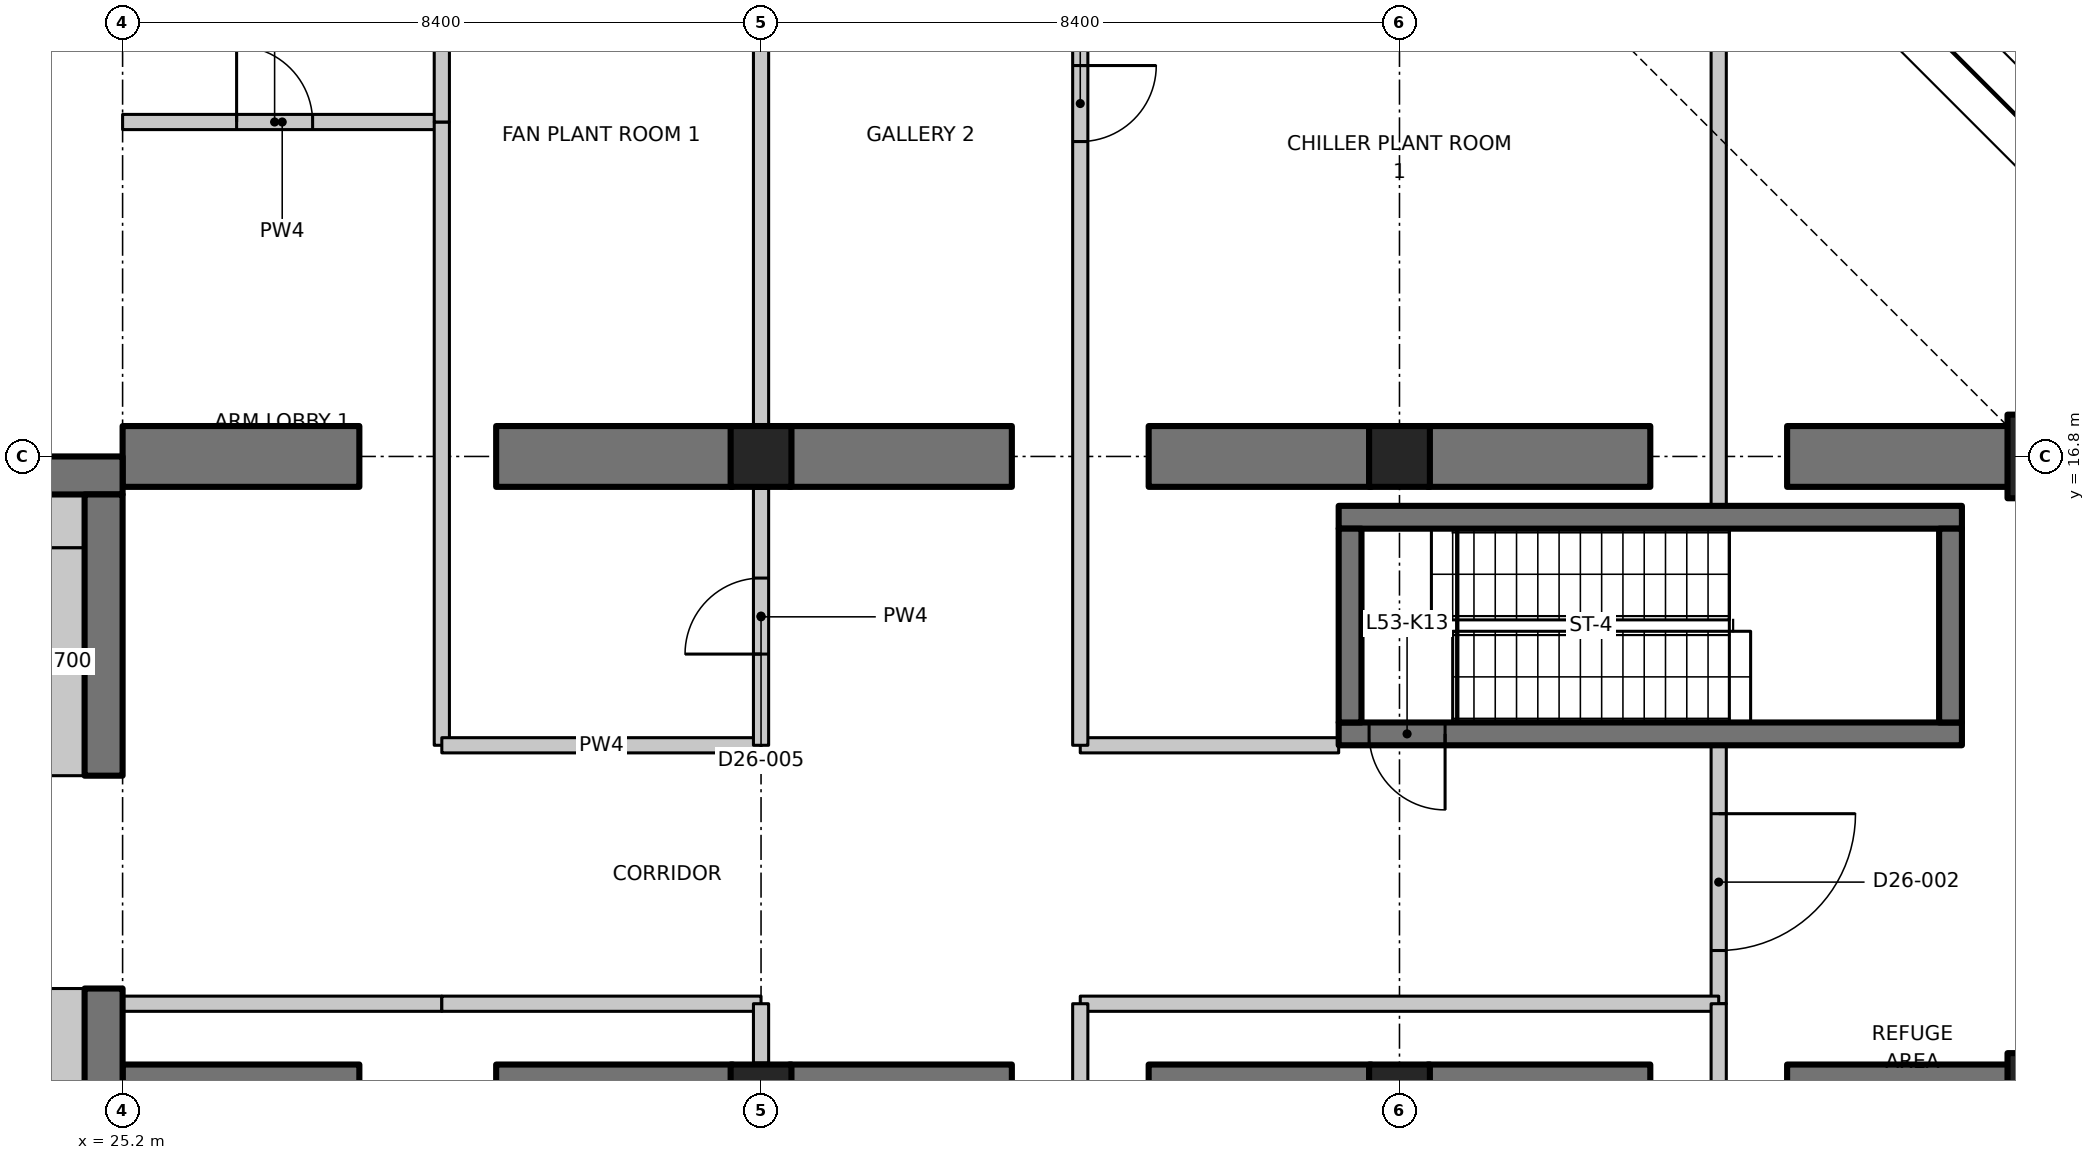
"""IFC4 building model, lengths in metres.
Left out: names, types, materials, properties, quantities, classifications, styles, units other than length and angle.
Written with IfcOpenShell. Run it as: python <this file> out.ifc"""

import sys

from ifc_helpers import new_model, si_unit, direction, frame, frame_2d, origin, origin_2d, place, context, subcontext, project, spatial, polyline, rectangle, outline, extrude, element, fill, save


model = new_model("IFC4")
c1 = context("Model", 3, precision=1e-05, world=origin(), true_north=direction((0.0, 1.0)))
c2 = subcontext(c1, "Body", "Model", "MODEL_VIEW")
j1 = project(units=[si_unit("LENGTHUNIT", "METRE"), si_unit("PLANEANGLEUNIT", "RADIAN")], contexts=[c1])
p1 = place(None, origin())
s1 = spatial("IfcSite", under=j1, at=p1, CompositionType="ELEMENT")
p2 = place(p1, origin())
s2 = spatial("IfcBuilding", under=s1, at=p2, CompositionType="ELEMENT")
p3 = place(p2, frame((0.0, 0.0, 210.9)))
s3 = spatial("IfcBuildingStorey", under=s2, at=p3, CompositionType="ELEMENT", Elevation=210.9)
for number, where, z_axis, x_axis in (
    (1, (33.6, 8.4, 0.0), (0.0, 0.0, 1.0), (1.0, 0.0, 0.0)),
    (2, (33.6, 16.8, 0.0), (0.0, 0.0, 1.0), (1.0, 0.0, 0.0)),
    (3, (42.0, 8.4, 0.0), (0.0, 0.0, 1.0), (1.0, 0.0, 0.0)),
    (4, (42.0, 16.8, 0.0), (0.0, 0.0, 1.0), (1.0, 0.0, 0.0)),
):
    element("IfcColumn", number, at=place(p3, frame(where, z_axis=z_axis, x_axis=x_axis)), inside=s3, PredefinedType="COLUMN", context=c2, shape_type="SweptSolid", body=[
        extrude(rectangle(XDim=0.8, YDim=0.8, at=origin_2d()), origin(), (0.0, 0.0, 1.0), 4.55),
    ])
for number, where, z_axis, x_axis in (
    (5, (50.4, 8.4, 0.0), (0.0, 0.0, 1.0), (1.0, 0.0, 0.0)),
    (6, (50.4, 16.8, 0.0), (0.0, 0.0, 1.0), (1.0, 0.0, 0.0)),
):
    element("IfcColumn", number, at=place(p3, frame(where, z_axis=z_axis, x_axis=x_axis)), inside=s3, PredefinedType="COLUMN", context=c2, shape_type="SweptSolid", body=[
        extrude(rectangle(XDim=0.8, YDim=1.1, at=origin_2d()), origin(), (0.0, 0.0, 1.0), 4.55),
    ])
for number, where, z_axis, x_axis in (
    (7, (25.2, 8.4, 0.0), (0.0, 0.0, 1.0), (1.0, 0.0, 0.0)),
    (8, (30.115, 8.4, 0.0), (0.0, 0.0, 1.0), (1.0, 0.0, 0.0)),
):
    element("IfcWall", number, at=place(p3, frame(where, z_axis=z_axis, x_axis=x_axis)), inside=s3, PredefinedType="SHEAR", context=c2, shape_type="SweptSolid", body=[
        extrude(rectangle(XDim=3.115, YDim=0.8, at=frame_2d((1.558, 0.0))), origin(), (0.0, 0.0, 1.0), 4.55),
    ])
for number, where, z_axis, x_axis in (
    (9, (33.97, 8.4, 0.0), (0.0, 0.0, 1.0), (1.0, 0.0, 0.0)),
    (10, (38.7, 8.4, 0.0), (0.0, 0.0, 1.0), (1.0, 0.0, 0.0)),
    (11, (42.37, 8.4, 0.0), (0.0, 0.0, 1.0), (1.0, 0.0, 0.0)),
    (12, (47.1, 8.4, 0.0), (0.0, 0.0, 1.0), (1.0, 0.0, 0.0)),
):
    element("IfcWall", number, at=place(p3, frame(where, z_axis=z_axis, x_axis=x_axis)), inside=s3, PredefinedType="SHEAR", context=c2, shape_type="SweptSolid", body=[
        extrude(rectangle(XDim=2.93, YDim=0.8, at=frame_2d((1.465, 0.0))), origin(), (0.0, 0.0, 1.0), 4.55),
    ])
for number, where, z_axis, x_axis in (
    (13, (25.2, 16.8, 0.0), (0.0, 0.0, 1.0), (1.0, 0.0, 0.0)),
    (14, (30.115, 16.8, 0.0), (0.0, 0.0, 1.0), (1.0, 0.0, 0.0)),
):
    element("IfcWall", number, at=place(p3, frame(where, z_axis=z_axis, x_axis=x_axis)), inside=s3, PredefinedType="SHEAR", context=c2, shape_type="SweptSolid", body=[
        extrude(rectangle(XDim=3.115, YDim=0.8, at=frame_2d((1.558, 0.0))), origin(), (0.0, 0.0, 1.0), 4.55),
    ])
for number, where, z_axis, x_axis in (
    (15, (33.97, 16.8, 0.0), (0.0, 0.0, 1.0), (1.0, 0.0, 0.0)),
    (16, (38.7, 16.8, 0.0), (0.0, 0.0, 1.0), (1.0, 0.0, 0.0)),
    (17, (42.37, 16.8, 0.0), (0.0, 0.0, 1.0), (1.0, 0.0, 0.0)),
    (18, (47.1, 16.8, 0.0), (0.0, 0.0, 1.0), (1.0, 0.0, 0.0)),
):
    element("IfcWall", number, at=place(p3, frame(where, z_axis=z_axis, x_axis=x_axis)), inside=s3, PredefinedType="SHEAR", context=c2, shape_type="SweptSolid", body=[
        extrude(rectangle(XDim=2.93, YDim=0.8, at=frame_2d((1.465, 0.0))), origin(), (0.0, 0.0, 1.0), 4.55),
    ])
p4 = place(p3, frame((23.8, 16.55, 0.0), z_axis=(0.0, 0.0, 1.0), x_axis=(1.0, 0.0, 0.0)))
e19 = element("IfcWall", 19, at=p4, inside=s3, PredefinedType="SHEAR", context=c2, shape_type="SweptSolid", body=[
    extrude(rectangle(XDim=1.4, YDim=0.5, at=frame_2d((0.7, 0.0))), origin(), (0.0, 0.0, 1.0), 4.55),
])
p5 = place(p3, frame((24.95, 0.5, 0.0), z_axis=(0.0, 0.0, 1.0), x_axis=(0.0, 1.0, 0.0)))
e20 = element("IfcWall", 20, at=p5, inside=s3, PredefinedType="SHEAR", context=c2, shape_type="SweptSolid", body=[
    extrude(rectangle(XDim=9.3, YDim=0.5, at=frame_2d((4.65, 0.0))), origin(), (0.0, 0.0, 1.0), 4.55),
])
p6 = place(p3, frame((24.95, 12.6, 0.0), z_axis=(0.0, 0.0, 1.0), x_axis=(0.0, 1.0, 0.0)))
e21 = element("IfcWall", 21, at=p6, inside=s3, PredefinedType="SHEAR", context=c2, shape_type="SweptSolid", body=[
    extrude(rectangle(XDim=3.7, YDim=0.5, at=frame_2d((1.85, 0.0))), origin(), (0.0, 0.0, 1.0), 4.55),
])
p7 = place(p3, frame((24.35, 12.6, 0.0), z_axis=(0.0, 0.0, 1.0), x_axis=(0.0, 1.0, 0.0)))
e22 = element("IfcWall", 22, at=p7, inside=s3, PredefinedType="PARTITIONING", context=c2, shape_type="SweptSolid", body=[
    extrude(rectangle(XDim=3.0, YDim=0.7, at=frame_2d((1.5, 0.0))), origin(), (0.0, 0.0, 1.0), 4.55),
])
p8 = place(p3, frame((23.8, 15.95, 0.0), z_axis=(0.0, 0.0, 1.0), x_axis=(1.0, 0.0, 0.0)))
e23 = element("IfcWall", 23, at=p8, inside=s3, PredefinedType="PARTITIONING", context=c2, shape_type="SweptSolid", body=[
    extrude(rectangle(XDim=0.9, YDim=0.7, at=frame_2d((0.45, 0.0))), origin(), (0.0, 0.0, 1.0), 4.55),
])
p9 = place(p3, frame((49.4, 13.15, 0.0), z_axis=(0.0, 0.0, 1.0), x_axis=(-1.0, 0.0, 0.0)))
e24 = element("IfcWall", 24, at=p9, inside=s3, PredefinedType="SHEAR", context=c2, shape_type="SweptSolid", body=[
    extrude(rectangle(XDim=8.2, YDim=0.3, at=frame_2d((4.1, 0.0))), origin(), (0.0, 0.0, 1.0), 4.55),
])
p10 = place(p9, frame((6.8, 0.0, 0.0)))
e25 = element("IfcOpeningElement", 25, at=p10, cuts=e24, PredefinedType="OPENING", context=c2, shape_type="SweptSolid", body=[
    extrude(rectangle(XDim=1.0, YDim=2.1, at=frame_2d((0.5, 1.05))), frame((0.0, 0.16, 0.0), z_axis=(0.0, -1.0, 0.0), x_axis=(1.0, 0.0, 0.0)), (0.0, 0.0, 1.0), 0.32),
])
p11 = place(p3, frame((41.2, 16.0, 0.0), z_axis=(0.0, 0.0, 1.0), x_axis=(1.0, 0.0, 0.0)))
e26 = element("IfcWall", 26, at=p11, inside=s3, PredefinedType="SHEAR", context=c2, shape_type="SweptSolid", body=[
    extrude(rectangle(XDim=8.2, YDim=0.3, at=frame_2d((4.1, 0.0))), origin(), (0.0, 0.0, 1.0), 4.55),
])
for number, where, z_axis, x_axis in (
    (27, (41.35, 13.3, 0.0), (0.0, 0.0, 1.0), (0.0, 1.0, 0.0)),
    (28, (49.25, 13.3, 0.0), (0.0, 0.0, 1.0), (0.0, 1.0, 0.0)),
):
    element("IfcWall", number, at=place(p3, frame(where, z_axis=z_axis, x_axis=x_axis)), inside=s3, PredefinedType="SHEAR", context=c2, shape_type="SweptSolid", body=[
        extrude(rectangle(XDim=2.55, YDim=0.3, at=frame_2d((1.275, 0.0))), origin(), (0.0, 0.0, 1.0), 4.55),
    ])
p12 = place(p3, frame((24.35, 4.35, 0.0), z_axis=(0.0, 0.0, 1.0), x_axis=(0.0, 1.0, 0.0)))
e29 = element("IfcWall", 29, at=p12, inside=s3, PredefinedType="PARTITIONING", context=c2, shape_type="SweptSolid", body=[
    extrude(rectangle(XDim=5.45, YDim=0.7, at=frame_2d((2.725, 0.0))), origin(), (0.0, 0.0, 1.0), 4.55),
])
p13 = place(p3, frame((25.2, 21.2, 0.0), z_axis=(0.0, 0.0, 1.0), x_axis=(1.0, 0.0, 0.0)))
e30 = element("IfcWall", 30, at=p13, inside=s3, PredefinedType="PARTITIONING", context=c2, shape_type="SweptSolid", body=[
    extrude(rectangle(XDim=4.2, YDim=0.2, at=frame_2d((2.1, 0.0))), origin(), (0.0, 0.0, 1.0), 4.53),
])
p14 = place(p13, frame((1.5, 0.0, 0.0)))
e31 = element("IfcOpeningElement", 31, at=p14, cuts=e30, PredefinedType="OPENING", context=c2, shape_type="SweptSolid", body=[
    extrude(rectangle(XDim=1.0, YDim=2.1, at=frame_2d((0.5, 1.05))), frame((0.0, 0.11, 0.0), z_axis=(0.0, -1.0, 0.0), x_axis=(1.0, 0.0, 0.0)), (0.0, 0.0, 1.0), 0.22),
])
p15 = place(p3, frame((29.4, 9.6, 0.0), z_axis=(0.0, 0.0, 1.0), x_axis=(-1.0, 0.0, 0.0)))
e32 = element("IfcWall", 32, at=p15, inside=s3, PredefinedType="PARTITIONING", context=c2, shape_type="SweptSolid", body=[
    extrude(rectangle(XDim=4.2, YDim=0.2, at=frame_2d((2.1, 0.0))), origin(), (0.0, 0.0, 1.0), 4.53),
])
p16 = place(p3, frame((29.4, 21.2, 0.0), z_axis=(0.0, 0.0, 1.0), x_axis=(0.0, -1.0, 0.0)))
e33 = element("IfcWall", 33, at=p16, inside=s3, PredefinedType="PARTITIONING", context=c2, shape_type="SweptSolid", body=[
    extrude(rectangle(XDim=8.2, YDim=0.2, at=frame_2d((4.1, 0.0))), origin(), (0.0, 0.0, 1.0), 4.53),
])
p17 = place(p3, frame((29.4, 27.51, 0.0), z_axis=(0.0, 0.0, 1.0), x_axis=(0.0, -1.0, 0.0)))
e34 = element("IfcWall", 34, at=p17, inside=s3, PredefinedType="PARTITIONING", context=c2, shape_type="SweptSolid", body=[
    extrude(outline(polyline([(0.0, 0.0), (6.31, 0.0), (6.31, 4.53), (2.76, 4.53), (2.758, 4.18), (1.862, 4.18), (1.86, 4.53), (0.235, 4.53), (0.0, 4.53), (0.0, 0.0)])), frame((0.0, 0.1, 0.0), z_axis=(0.0, -1.0, 0.0), x_axis=(1.0, 0.0, 0.0)), (0.0, 0.0, 1.0), 0.2),
])
p18 = place(p3, frame((46.2, 13.0, 0.0), z_axis=(0.0, 0.0, 1.0), x_axis=(0.0, -1.0, 0.0)))
e35 = element("IfcWall", 35, at=p18, inside=s3, PredefinedType="PARTITIONING", context=c2, shape_type="SweptSolid", body=[
    extrude(rectangle(XDim=3.4, YDim=0.2, at=frame_2d((1.7, 0.0))), origin(), (0.0, 0.0, 1.0), 4.53),
])
p19 = place(p18, frame((0.9, 0.0, 0.0)))
e36 = element("IfcOpeningElement", 36, at=p19, cuts=e35, PredefinedType="OPENING", context=c2, shape_type="SweptSolid", body=[
    extrude(rectangle(XDim=1.8, YDim=2.1, at=frame_2d((0.9, 1.05))), frame((0.0, 0.11, 0.0), z_axis=(0.0, -1.0, 0.0), x_axis=(1.0, 0.0, 0.0)), (0.0, 0.0, 1.0), 0.22),
])
p20 = place(p3, frame((33.6, 9.6, 0.0), z_axis=(0.0, 0.0, 1.0), x_axis=(-1.0, 0.0, 0.0)))
e37 = element("IfcWall", 37, at=p20, inside=s3, PredefinedType="PARTITIONING", context=c2, shape_type="SweptSolid", body=[
    extrude(rectangle(XDim=4.2, YDim=0.2, at=frame_2d((2.1, 0.0))), origin(), (0.0, 0.0, 1.0), 4.53),
])
p21 = place(p3, frame((46.2, 9.6, 0.0), z_axis=(0.0, 0.0, 1.0), x_axis=(-1.0, 0.0, 0.0)))
e38 = element("IfcWall", 38, at=p21, inside=s3, PredefinedType="PARTITIONING", context=c2, shape_type="SweptSolid", body=[
    extrude(rectangle(XDim=8.4, YDim=0.2, at=frame_2d((4.2, 0.0))), origin(), (0.0, 0.0, 1.0), 4.53),
])
p22 = place(p3, frame((29.4, 13.0, 0.0), z_axis=(0.0, 0.0, 1.0), x_axis=(1.0, 0.0, 0.0)))
e39 = element("IfcWall", 39, at=p22, inside=s3, PredefinedType="PARTITIONING", context=c2, shape_type="SweptSolid", body=[
    extrude(rectangle(XDim=4.2, YDim=0.2, at=frame_2d((2.1, 0.0))), origin(), (0.0, 0.0, 1.0), 4.53),
])
p23 = place(p3, frame((37.8, 13.0, 0.0), z_axis=(0.0, 0.0, 1.0), x_axis=(1.0, 0.0, 0.0)))
e40 = element("IfcWall", 40, at=p23, inside=s3, PredefinedType="PARTITIONING", context=c2, shape_type="SweptSolid", body=[
    extrude(rectangle(XDim=3.4, YDim=0.2, at=frame_2d((1.7, 0.0))), origin(), (0.0, 0.0, 1.0), 4.53),
])
p24 = place(p3, frame((46.2, -0.2, 0.0), z_axis=(0.0, 0.0, 1.0), x_axis=(0.0, 1.0, 0.0)))
e41 = element("IfcWall", 41, at=p24, inside=s3, PredefinedType="PARTITIONING", context=c2, shape_type="SweptSolid", body=[
    extrude(outline(polyline([(0.0, 0.0), (9.8, 0.0), (9.8, 4.53), (5.116, 4.53), (5.114, 4.18), (3.686, 4.18), (3.684, 4.53), (0.0, 4.53), (0.0, 0.0)])), frame((0.0, 0.1, 0.0), z_axis=(0.0, -1.0, 0.0), x_axis=(1.0, 0.0, 0.0)), (0.0, 0.0, 1.0), 0.2),
])
p25 = place(p3, frame((46.2, 16.15, 0.0), z_axis=(0.0, 0.0, 1.0), x_axis=(0.0, 1.0, 0.0)))
e42 = element("IfcWall", 42, at=p25, inside=s3, PredefinedType="PARTITIONING", context=c2, shape_type="SweptSolid", body=[
    extrude(outline(polyline([(0.0, 0.0), (9.654, 0.0), (9.654, 4.53), (9.25, 4.53), (5.566, 4.53), (5.564, 4.18), (4.136, 4.18), (4.134, 4.53), (0.0, 4.53), (0.0, 0.0)])), frame((0.0, 0.1, 0.0), z_axis=(0.0, -1.0, 0.0), x_axis=(1.0, 0.0, 0.0)), (0.0, 0.0, 1.0), 0.2),
])
p26 = place(p3, frame((33.6, 8.82, 0.0), z_axis=(0.0, 0.0, 1.0), x_axis=(0.0, 1.0, 0.0)))
e43 = element("IfcWall", 43, at=p26, inside=s3, PredefinedType="PARTITIONING", context=c2, shape_type="SweptSolid", body=[
    extrude(rectangle(XDim=0.78, YDim=0.2, at=frame_2d((0.39, 0.0))), origin(), (0.0, 0.0, 1.0), 4.53),
])
p27 = place(p3, frame((37.8, 9.6, 0.0), z_axis=(0.0, 0.0, 1.0), x_axis=(0.0, -1.0, 0.0)))
e44 = element("IfcWall", 44, at=p27, inside=s3, PredefinedType="PARTITIONING", context=c2, shape_type="SweptSolid", body=[
    extrude(outline(polyline([(0.0, 0.0), (12.622, 0.0), (12.622, 4.53), (10.05, 4.53), (10.048, 4.18), (9.152, 4.18), (9.15, 4.53), (0.0, 4.53), (0.0, 0.0)])), frame((0.0, 0.1, 0.0), z_axis=(0.0, -1.0, 0.0), x_axis=(1.0, 0.0, 0.0)), (0.0, 0.0, 1.0), 0.2),
])
p28 = place(p27, frame((5.7, 0.0, 0.0)))
e45 = element("IfcOpeningElement", 45, at=p28, cuts=e44, PredefinedType="OPENING", context=c2, shape_type="SweptSolid", body=[
    extrude(rectangle(XDim=1.0, YDim=2.1, at=frame_2d((0.5, 1.05))), frame((0.0, 0.11, 0.0), z_axis=(0.0, -1.0, 0.0), x_axis=(1.0, 0.0, 0.0)), (0.0, 0.0, 1.0), 0.22),
])
p29 = place(p3, frame((33.6, 13.0, 0.0), z_axis=(0.0, 0.0, 1.0), x_axis=(0.0, 1.0, 0.0)))
e46 = element("IfcWall", 46, at=p29, inside=s3, PredefinedType="PARTITIONING", context=c2, shape_type="SweptSolid", body=[
    extrude(rectangle(XDim=3.38, YDim=0.2, at=frame_2d((1.69, 0.0))), origin(), (0.0, 0.0, 1.0), 4.53),
])
p30 = place(p29, frame((1.2, 0.0, 0.0)))
e47 = element("IfcOpeningElement", 47, at=p30, cuts=e46, PredefinedType="OPENING", context=c2, shape_type="SweptSolid", body=[
    extrude(rectangle(XDim=1.0, YDim=2.1, at=frame_2d((0.5, 1.05))), frame((0.0, 0.11, 0.0), z_axis=(0.0, -1.0, 0.0), x_axis=(1.0, 0.0, 0.0)), (0.0, 0.0, 1.0), 0.22),
])
p31 = place(p3, frame((33.6, 17.22, 0.0), z_axis=(0.0, 0.0, 1.0), x_axis=(0.0, 1.0, 0.0)))
e48 = element("IfcWall", 48, at=p31, inside=s3, PredefinedType="PARTITIONING", context=c2, shape_type="SweptSolid", body=[
    extrude(outline(polyline([(0.0, 0.0), (7.585, 0.0), (7.585, 4.18), (7.532, 4.18), (7.53, 4.53), (0.0, 4.53), (0.0, 0.0)])), frame((0.0, 0.1, 0.0), z_axis=(0.0, -1.0, 0.0), x_axis=(1.0, 0.0, 0.0)), (0.0, 0.0, 1.0), 0.2),
])
p32 = place(p3, frame((37.8, 30.525, 0.0), z_axis=(0.0, 0.0, 1.0), x_axis=(0.0, -1.0, 0.0)))
e49 = element("IfcWall", 49, at=p32, inside=s3, PredefinedType="PARTITIONING", context=c2, shape_type="SweptSolid", body=[
    extrude(outline(polyline([(0.0, 0.0), (17.525, 0.0), (17.525, 4.53), (5.775, 4.53), (5.773, 4.18), (4.877, 4.18), (4.875, 4.53), (0.282, 4.53), (0.0, 4.53), (0.0, 0.0)])), frame((0.0, 0.1, 0.0), z_axis=(0.0, -1.0, 0.0), x_axis=(1.0, 0.0, 0.0)), (0.0, 0.0, 1.0), 0.2),
])
p33 = place(p32, frame((8.582, 0.0, 0.0)))
e50 = element("IfcOpeningElement", 50, at=p33, cuts=e49, PredefinedType="OPENING", context=c2, shape_type="SweptSolid", body=[
    extrude(rectangle(XDim=1.0, YDim=2.1, at=frame_2d((0.5, 1.05))), frame((0.0, 0.11, 0.0), z_axis=(0.0, -1.0, 0.0), x_axis=(1.0, 0.0, 0.0)), (0.0, 0.0, 1.0), 0.22),
])
p34 = place(p10, origin())
e51 = element("IfcDoor", 51, at=p34, inside=s3, OperationType="SINGLE_SWING_LEFT", PredefinedType="DOOR", context=c2, shape_type="SweptSolid", body=[
    extrude(rectangle(XDim=1.0, YDim=2.1, at=frame_2d((0.5, 1.05))), frame((0.0, 0.025, 0.0), z_axis=(0.0, -1.0, 0.0), x_axis=(1.0, 0.0, 0.0)), (0.0, 0.0, 1.0), 0.05),
])
fill(e25, e51)
p35 = place(p14, origin())
e52 = element("IfcDoor", 52, at=p35, inside=s3, OperationType="SINGLE_SWING_LEFT", PredefinedType="DOOR", context=c2, shape_type="SweptSolid", body=[
    extrude(rectangle(XDim=1.0, YDim=2.1, at=frame_2d((0.5, 1.05))), frame((0.0, 0.025, 0.0), z_axis=(0.0, -1.0, 0.0), x_axis=(1.0, 0.0, 0.0)), (0.0, 0.0, 1.0), 0.05),
])
fill(e31, e52)
p36 = place(p19, origin())
e53 = element("IfcDoor", 53, at=p36, inside=s3, OperationType="DOUBLE_DOOR_SINGLE_SWING", PredefinedType="DOOR", context=c2, shape_type="SweptSolid", body=[
    extrude(rectangle(XDim=1.8, YDim=2.1, at=frame_2d((0.9, 1.05))), frame((0.0, 0.025, 0.0), z_axis=(0.0, -1.0, 0.0), x_axis=(1.0, 0.0, 0.0)), (0.0, 0.0, 1.0), 0.05),
])
fill(e36, e53)
p37 = place(p30, origin())
e54 = element("IfcDoor", 54, at=p37, inside=s3, OperationType="SINGLE_SWING_LEFT", PredefinedType="DOOR", context=c2, shape_type="SweptSolid", body=[
    extrude(rectangle(XDim=1.0, YDim=2.1, at=frame_2d((0.5, 1.05))), frame((0.0, 0.025, 0.0), z_axis=(0.0, -1.0, 0.0), x_axis=(1.0, 0.0, 0.0)), (0.0, 0.0, 1.0), 0.05),
])
fill(e47, e54)
p38 = place(p33, origin())
e55 = element("IfcDoor", 55, at=p38, inside=s3, OperationType="SINGLE_SWING_LEFT", PredefinedType="DOOR", context=c2, shape_type="SweptSolid", body=[
    extrude(rectangle(XDim=1.0, YDim=2.1, at=frame_2d((0.5, 1.05))), frame((0.0, 0.025, 0.0), z_axis=(0.0, -1.0, 0.0), x_axis=(1.0, 0.0, 0.0)), (0.0, 0.0, 1.0), 0.05),
])
fill(e50, e55)
save(model, sys.argv[1])
